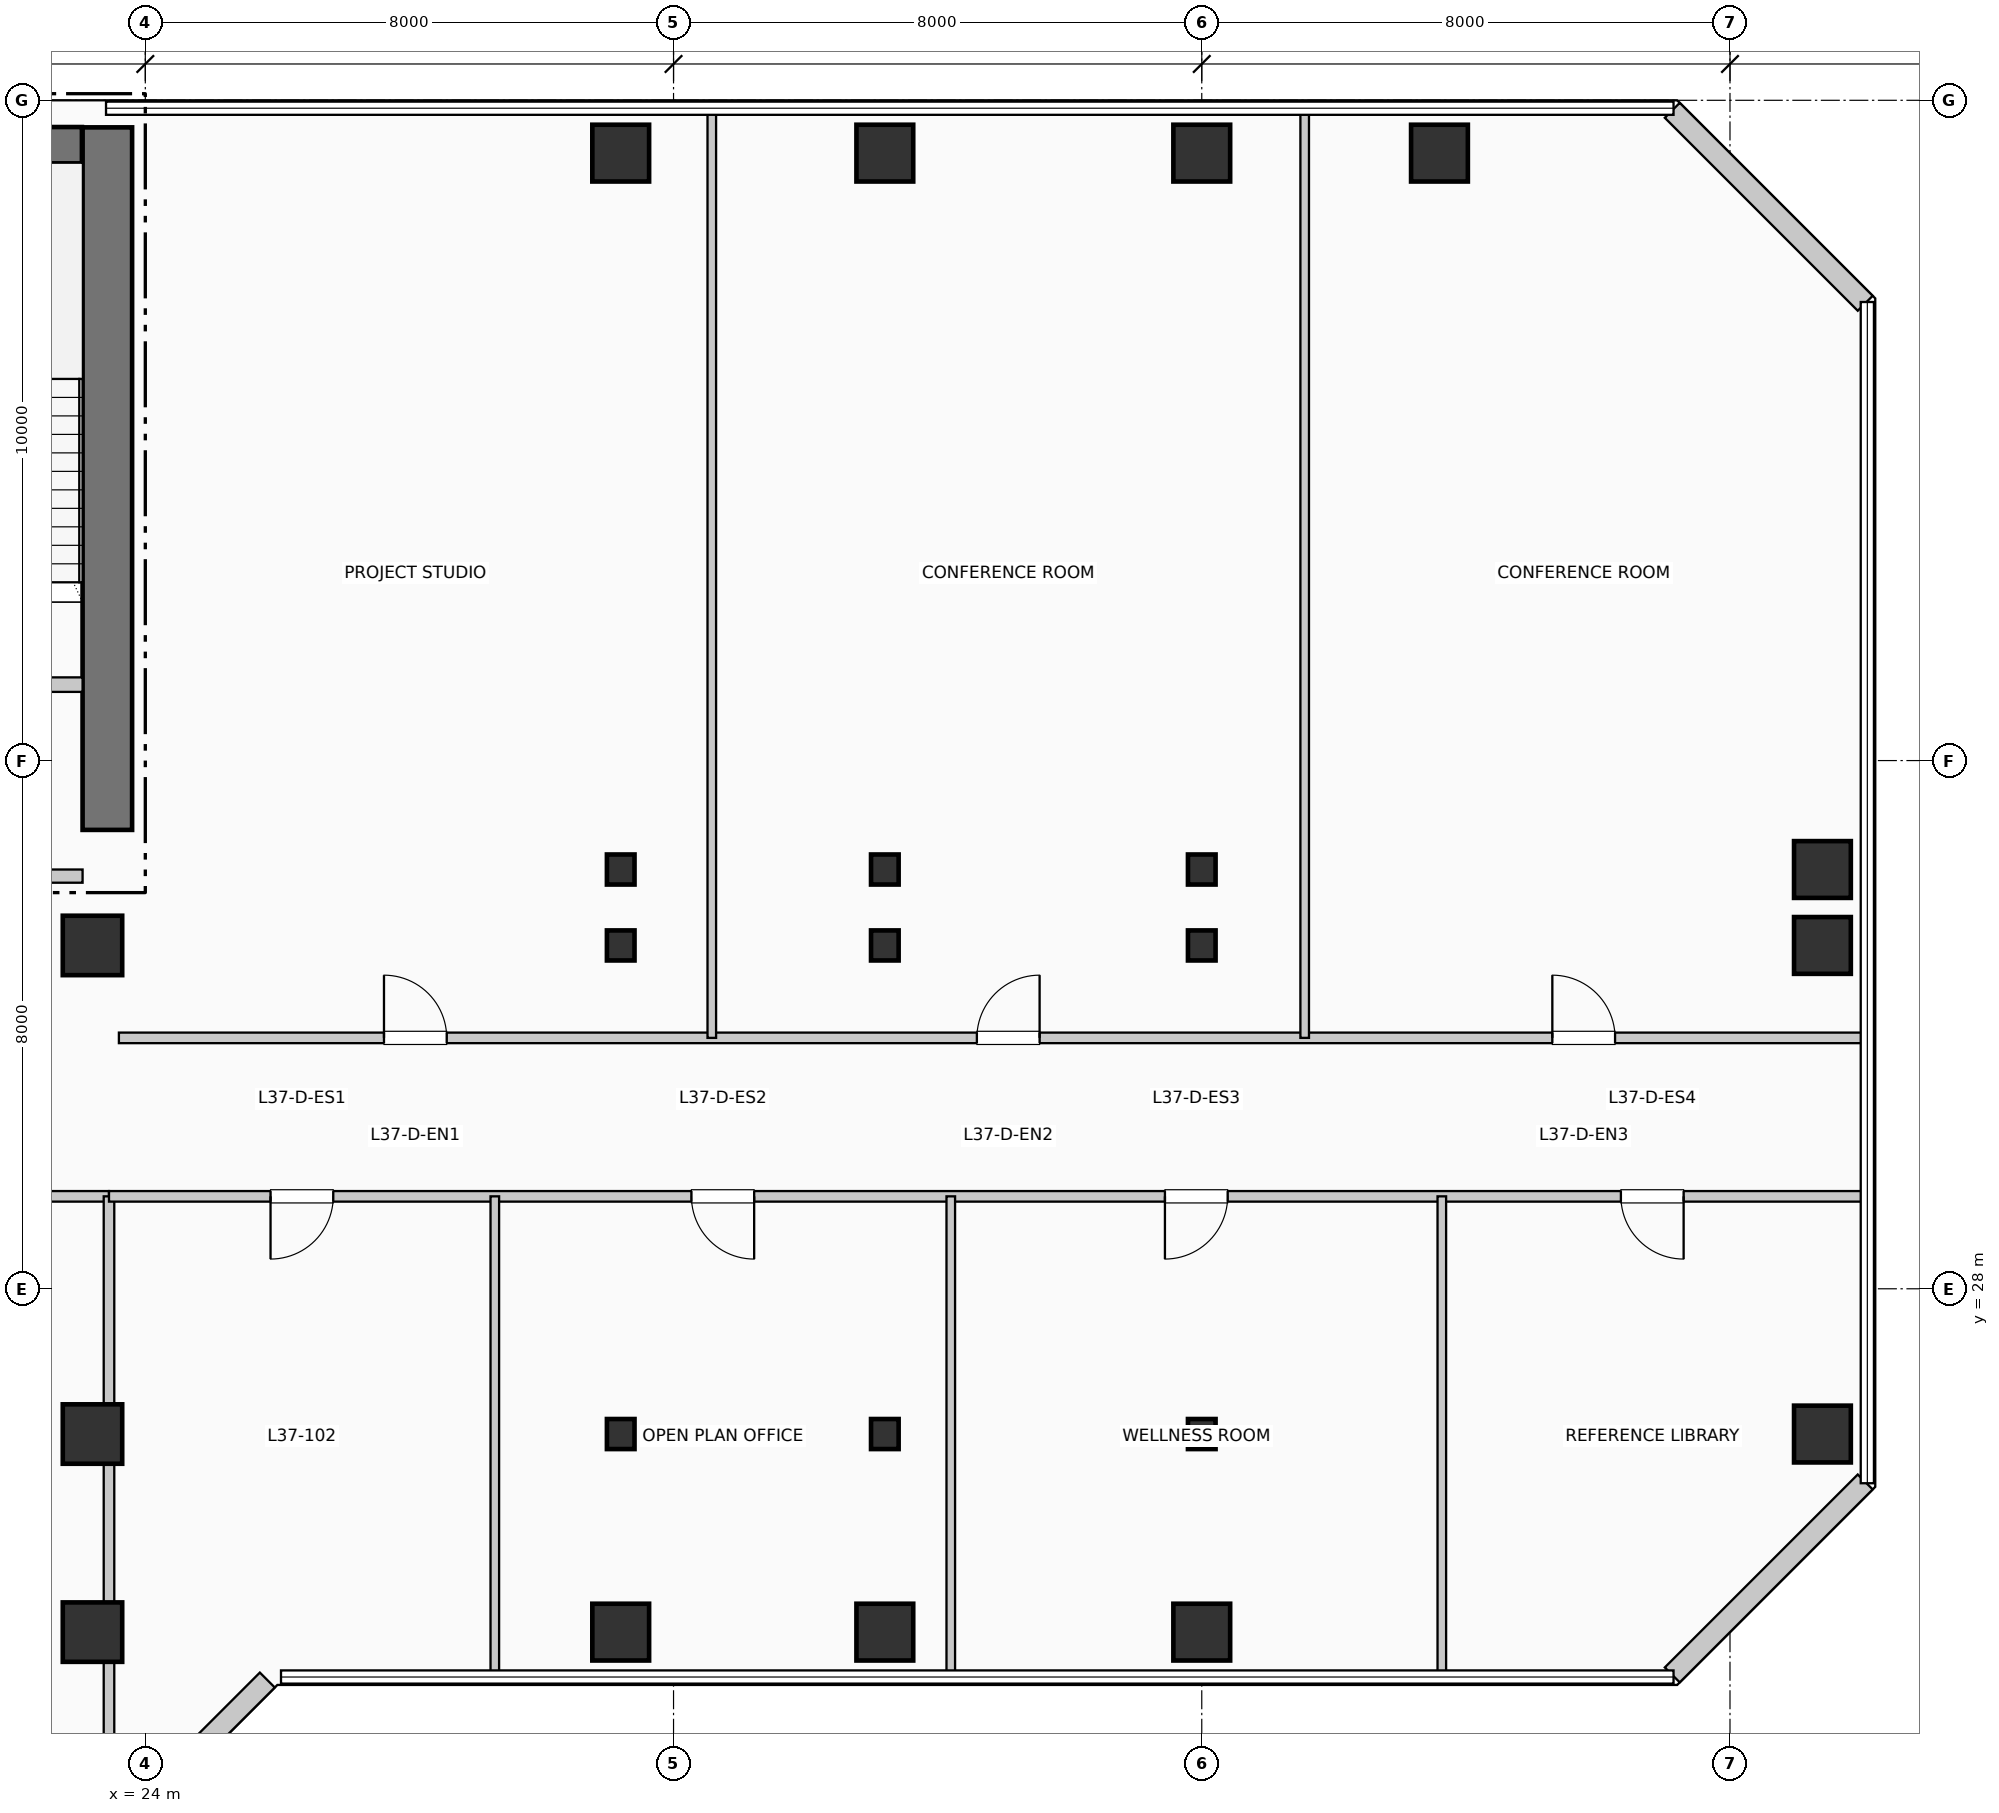
"""IFC4 building model, lengths in metres.
Left out: names, types, materials, properties, quantities, classifications, styles, units other than length and angle.
Written with IfcOpenShell. Run it as: python <this file> out.ifc"""

import sys

from ifc_helpers import new_model, si_unit, direction, frame, frame_2d, origin, origin_2d, place, context, subcontext, project, spatial, rectangle, i_section, extrude, element, fill, save


model = new_model("IFC4")
c1 = context("Model", 3, precision=1e-05, world=origin(), true_north=direction((0.0, 1.0)))
c2 = subcontext(c1, "Body", "Model", "MODEL_VIEW")
j1 = project(units=[si_unit("LENGTHUNIT", "METRE"), si_unit("PLANEANGLEUNIT", "RADIAN")], contexts=[c1])
p1 = place(None, origin())
s1 = spatial("IfcSite", under=j1, at=p1, CompositionType="ELEMENT")
p2 = place(p1, origin())
s2 = spatial("IfcBuilding", under=s1, at=p2, CompositionType="ELEMENT")
p3 = place(p2, frame((0.0, 0.0, 154.77)))
s3 = spatial("IfcBuildingStorey", under=s2, at=p3, CompositionType="ELEMENT", Elevation=154.77)
p4 = place(p3, frame((23.425, 34.95, 0.0), z_axis=(0.0, 0.0, 1.0), x_axis=(0.0, 1.0, 0.0)))
e1 = element("IfcWall", 1, at=p4, inside=s3, PredefinedType="SHEAR", context=c2, shape_type="SweptSolid", body=[
    extrude(rectangle(XDim=10.64, YDim=0.75, at=frame_2d((5.32, 0.0))), origin(), (0.0, 0.0, 1.0), 3.96),
])
p5 = place(p3, frame((19.35, 45.32, 0.0), z_axis=(0.0, 0.0, 1.0), x_axis=(1.0, 0.0, 0.0)))
e2 = element("IfcWall", 2, at=p5, inside=s3, PredefinedType="SHEAR", context=c2, shape_type="SweptSolid", body=[
    extrude(rectangle(XDim=3.69, YDim=0.55, at=frame_2d((1.845, 0.0))), origin(), (0.0, 0.0, 1.0), 3.96),
])
p6 = place(p5, frame((1.15, 0.0, 1.05)))
e3 = element("IfcOpeningElement", 3, at=p6, cuts=e2, PredefinedType="OPENING", context=c2, shape_type="SweptSolid", body=[
    extrude(rectangle(XDim=1.4, YDim=1.8, at=frame_2d((0.7, 0.9))), frame((0.0, 0.285, 0.0), z_axis=(0.0, -1.0, 0.0), x_axis=(1.0, 0.0, 0.0)), (0.0, 0.0, 1.0), 0.57),
])
for number, where, z_axis, x_axis in (
    (4, (23.2, 22.8, 0.0), (0.0, 0.0, 1.0), (1.0, 0.0, 0.0)),
    (5, (23.2, 25.8, 0.0), (0.0, 0.0, 1.0), (1.0, 0.0, 0.0)),
    (6, (23.2, 33.2, 0.0), (0.0, 0.0, 1.0), (1.0, 0.0, 0.0)),
):
    element("IfcColumn", number, at=place(p3, frame(where, z_axis=z_axis, x_axis=x_axis)), inside=s3, PredefinedType="COLUMN", context=c2, shape_type="SweptSolid", body=[
        extrude(rectangle(XDim=0.9, YDim=0.9, at=origin_2d()), origin(), (0.0, 0.0, 1.0), 3.96),
    ])
p7 = place(p3, frame((31.2, 22.8, 0.0), z_axis=(0.0, 0.0, 1.0), x_axis=(1.0, 0.0, 0.0)))
e7 = element("IfcColumn", 7, at=p7, inside=s3, PredefinedType="COLUMN", context=c2, shape_type="SweptSolid", body=[
    extrude(rectangle(XDim=0.86, YDim=0.86, at=origin_2d()), origin(), (0.0, 0.0, 1.0), 3.96),
])
for number, where, z_axis, x_axis in (
    (8, (31.2, 25.8, 0.0), (0.0, 0.0, 1.0), (1.0, 0.0, 0.0)),
    (9, (31.2, 33.2, 0.0), (0.0, 0.0, 1.0), (1.0, 0.0, 0.0)),
    (10, (31.2, 34.35, 0.0), (0.0, 0.0, 1.0), (1.0, 0.0, 0.0)),
):
    element("IfcColumn", number, at=place(p3, frame(where, z_axis=z_axis, x_axis=x_axis)), inside=s3, PredefinedType="COLUMN", context=c2, shape_type="SweptSolid", body=[
        extrude(i_section(OverallWidth=0.418, OverallDepth=0.455, WebThickness=0.032, FlangeThickness=0.051, at=origin_2d()), origin(), (0.0, 0.0, 1.0), 3.96),
    ])
for number, where, z_axis, x_axis in (
    (11, (31.2, 45.2, 0.0), (0.0, 0.0, 1.0), (1.0, 0.0, 0.0)),
    (12, (35.2, 22.8, 0.0), (0.0, 0.0, 1.0), (1.0, 0.0, 0.0)),
):
    element("IfcColumn", number, at=place(p3, frame(where, z_axis=z_axis, x_axis=x_axis)), inside=s3, PredefinedType="COLUMN", context=c2, shape_type="SweptSolid", body=[
        extrude(rectangle(XDim=0.86, YDim=0.86, at=origin_2d()), origin(), (0.0, 0.0, 1.0), 3.96),
    ])
for number, where, z_axis, x_axis in (
    (13, (35.2, 25.8, 0.0), (0.0, 0.0, 1.0), (1.0, 0.0, 0.0)),
    (14, (35.2, 33.2, 0.0), (0.0, 0.0, 1.0), (1.0, 0.0, 0.0)),
    (15, (35.2, 34.35, 0.0), (0.0, 0.0, 1.0), (1.0, 0.0, 0.0)),
):
    element("IfcColumn", number, at=place(p3, frame(where, z_axis=z_axis, x_axis=x_axis)), inside=s3, PredefinedType="COLUMN", context=c2, shape_type="SweptSolid", body=[
        extrude(i_section(OverallWidth=0.418, OverallDepth=0.455, WebThickness=0.032, FlangeThickness=0.051, at=origin_2d()), origin(), (0.0, 0.0, 1.0), 3.96),
    ])
for number, where, z_axis, x_axis in (
    (16, (35.2, 45.2, 0.0), (0.0, 0.0, 1.0), (1.0, 0.0, 0.0)),
    (17, (40.0, 22.8, 0.0), (0.0, 0.0, 1.0), (1.0, 0.0, 0.0)),
):
    element("IfcColumn", number, at=place(p3, frame(where, z_axis=z_axis, x_axis=x_axis)), inside=s3, PredefinedType="COLUMN", context=c2, shape_type="SweptSolid", body=[
        extrude(rectangle(XDim=0.86, YDim=0.86, at=origin_2d()), origin(), (0.0, 0.0, 1.0), 3.96),
    ])
for number, where, z_axis, x_axis in (
    (18, (40.0, 25.8, 0.0), (0.0, 0.0, 1.0), (1.0, 0.0, 0.0)),
    (19, (40.0, 33.2, 0.0), (0.0, 0.0, 1.0), (1.0, 0.0, 0.0)),
    (20, (40.0, 34.35, 0.0), (0.0, 0.0, 1.0), (1.0, 0.0, 0.0)),
):
    element("IfcColumn", number, at=place(p3, frame(where, z_axis=z_axis, x_axis=x_axis)), inside=s3, PredefinedType="COLUMN", context=c2, shape_type="SweptSolid", body=[
        extrude(i_section(OverallWidth=0.418, OverallDepth=0.455, WebThickness=0.032, FlangeThickness=0.051, at=origin_2d()), origin(), (0.0, 0.0, 1.0), 3.96),
    ])
for number, where, z_axis, x_axis in (
    (21, (40.0, 45.2, 0.0), (0.0, 0.0, 1.0), (1.0, 0.0, 0.0)),
    (22, (43.6, 45.2, 0.0), (0.0, 0.0, 1.0), (1.0, 0.0, 0.0)),
    (23, (49.4, 25.8, 0.0), (0.0, 0.0, 1.0), (1.0, 0.0, 0.0)),
    (24, (49.4, 33.2, 0.0), (0.0, 0.0, 1.0), (1.0, 0.0, 0.0)),
    (25, (49.4, 34.35, 0.0), (0.0, 0.0, 1.0), (1.0, 0.0, 0.0)),
):
    element("IfcColumn", number, at=place(p3, frame(where, z_axis=z_axis, x_axis=x_axis)), inside=s3, PredefinedType="COLUMN", context=c2, shape_type="SweptSolid", body=[
        extrude(rectangle(XDim=0.86, YDim=0.86, at=origin_2d()), origin(), (0.0, 0.0, 1.0), 3.96),
    ])
p8 = place(p3, frame((23.926, 20.152, 0.0), z_axis=(0.0, 0.0, 1.0), x_axis=(0.707106781187, 0.707106781187, 0.0)))
e26 = element("IfcWall", 26, at=p8, inside=s3, PredefinedType="SOLIDWALL", context=c2, shape_type="SweptSolid", body=[
    extrude(rectangle(XDim=2.718, YDim=0.32, at=frame_2d((1.359, 0.0))), origin(), (0.0, 0.0, 1.0), 3.71),
])
for number, where, z_axis, x_axis in (
    (27, (47.126, 22.152, 0.0), (0.0, 0.0, 1.0), (0.707, 0.707, 0.0)),
    (28, (50.048, 42.926, 0.0), (0.0, 0.0, 1.0), (-0.707, 0.707, 0.0)),
):
    element("IfcWall", number, at=place(p3, frame(where, z_axis=z_axis, x_axis=x_axis)), inside=s3, PredefinedType="SOLIDWALL", context=c2, shape_type="SweptSolid", body=[
        extrude(rectangle(XDim=4.133, YDim=0.32, at=frame_2d((2.066, 0.0))), origin(), (0.0, 0.0, 1.0), 3.71),
    ])
p9 = place(p3, frame((19.9, 37.15, 0.0), z_axis=(0.0, 0.0, 1.0), x_axis=(1.0, 0.0, 0.0)))
e29 = element("IfcWall", 29, at=p9, inside=s3, PredefinedType="PARTITIONING", context=c2, shape_type="SweptSolid", body=[
    extrude(rectangle(XDim=3.15, YDim=0.22, at=frame_2d((1.575, 0.0))), origin(), (0.0, 0.0, 1.0), 3.71),
])
p10 = place(p9, frame((2.05, 0.0, 0.0), z_axis=(0.0, 0.0, 1.0), x_axis=(-1.0, 0.0, 0.0)))
e30 = element("IfcOpeningElement", 30, at=p10, cuts=e29, PredefinedType="OPENING", context=c2, shape_type="SweptSolid", body=[
    extrude(rectangle(XDim=1.05, YDim=2.15, at=frame_2d((0.525, 1.075))), frame((0.0, 0.12, 0.0), z_axis=(0.0, -1.0, 0.0), x_axis=(1.0, 0.0, 0.0)), (0.0, 0.0, 1.0), 0.24),
])
p11 = place(p3, frame((19.8, 34.25, 0.0), z_axis=(0.0, 0.0, 1.0), x_axis=(1.0, 0.0, 0.0)))
e31 = element("IfcWall", 31, at=p11, inside=s3, PredefinedType="PARTITIONING", context=c2, shape_type="SweptSolid", body=[
    extrude(rectangle(XDim=3.25, YDim=0.2, at=frame_2d((1.625, 0.0))), origin(), (0.0, 0.0, 1.0), 3.71),
])
p12 = place(p11, frame((2.15, 0.0, 0.0), z_axis=(0.0, 0.0, 1.0), x_axis=(-1.0, 0.0, 0.0)))
e32 = element("IfcOpeningElement", 32, at=p12, cuts=e31, PredefinedType="OPENING", context=c2, shape_type="SweptSolid", body=[
    extrude(rectangle(XDim=1.1, YDim=2.15, at=frame_2d((0.55, 1.075))), frame((0.0, 0.11, 0.0), z_axis=(0.0, -1.0, 0.0), x_axis=(1.0, 0.0, 0.0)), (0.0, 0.0, 1.0), 0.22),
])
p13 = place(p3, frame((10.9, 29.4, 0.0), z_axis=(0.0, 0.0, 1.0), x_axis=(1.0, 0.0, 0.0)))
e33 = element("IfcWall", 33, at=p13, inside=s3, PredefinedType="PARTITIONING", context=c2, shape_type="SweptSolid", body=[
    extrude(rectangle(XDim=12.55, YDim=0.16, at=frame_2d((6.275, 0.0))), origin(), (0.0, 0.0, 1.0), 3.365),
])
p14 = place(p3, frame((23.45, 0.19, 0.0), z_axis=(0.0, 0.0, 1.0), x_axis=(0.0, 1.0, 0.0)))
e34 = element("IfcWall", 34, at=p14, inside=s3, PredefinedType="PARTITIONING", context=c2, shape_type="SweptSolid", body=[
    extrude(rectangle(XDim=29.21, YDim=0.16, at=frame_2d((14.605, 0.0))), origin(), (0.0, 0.0, 1.0), 3.045),
])
p15 = place(p3, frame((23.45, 29.4, 0.0), z_axis=(0.0, 0.0, 1.0), x_axis=(1.0, 0.0, 0.0)))
e35 = element("IfcWall", 35, at=p15, inside=s3, PredefinedType="PARTITIONING", context=c2, shape_type="SweptSolid", body=[
    extrude(rectangle(XDim=26.56, YDim=0.16, at=frame_2d((13.28, 0.0))), origin(), (0.0, 0.0, 1.0), 3.365),
])
p16 = place(p15, frame((3.396, 0.0, 0.0), z_axis=(0.0, 0.0, 1.0), x_axis=(-1.0, 0.0, 0.0)))
e36 = element("IfcOpeningElement", 36, at=p16, cuts=e35, PredefinedType="OPENING", context=c2, shape_type="SweptSolid", body=[
    extrude(rectangle(XDim=0.95, YDim=2.15, at=frame_2d((0.475, 1.075))), frame((0.0, 0.09, 0.0), z_axis=(0.0, -1.0, 0.0), x_axis=(1.0, 0.0, 0.0)), (0.0, 0.0, 1.0), 0.18),
])
p17 = place(p15, frame((9.771, 0.0, 0.0), z_axis=(0.0, 0.0, 1.0), x_axis=(-1.0, 0.0, 0.0)))
e37 = element("IfcOpeningElement", 37, at=p17, cuts=e35, PredefinedType="OPENING", context=c2, shape_type="SweptSolid", body=[
    extrude(rectangle(XDim=0.95, YDim=2.15, at=frame_2d((0.475, 1.075))), frame((0.0, 0.09, 0.0), z_axis=(0.0, -1.0, 0.0), x_axis=(1.0, 0.0, 0.0)), (0.0, 0.0, 1.0), 0.18),
])
p18 = place(p15, frame((16.942, 0.0, 0.0), z_axis=(0.0, 0.0, 1.0), x_axis=(-1.0, 0.0, 0.0)))
e38 = element("IfcOpeningElement", 38, at=p18, cuts=e35, PredefinedType="OPENING", context=c2, shape_type="SweptSolid", body=[
    extrude(rectangle(XDim=0.95, YDim=2.15, at=frame_2d((0.475, 1.075))), frame((0.0, 0.09, 0.0), z_axis=(0.0, -1.0, 0.0), x_axis=(1.0, 0.0, 0.0)), (0.0, 0.0, 1.0), 0.18),
])
p19 = place(p15, frame((23.848, 0.0, 0.0), z_axis=(0.0, 0.0, 1.0), x_axis=(-1.0, 0.0, 0.0)))
e39 = element("IfcOpeningElement", 39, at=p19, cuts=e35, PredefinedType="OPENING", context=c2, shape_type="SweptSolid", body=[
    extrude(rectangle(XDim=0.95, YDim=2.15, at=frame_2d((0.475, 1.075))), frame((0.0, 0.09, 0.0), z_axis=(0.0, -1.0, 0.0), x_axis=(1.0, 0.0, 0.0)), (0.0, 0.0, 1.0), 0.18),
])
p20 = place(p3, frame((23.6, 31.8, 0.0), z_axis=(0.0, 0.0, 1.0), x_axis=(1.0, 0.0, 0.0)))
e40 = element("IfcWall", 40, at=p20, inside=s3, PredefinedType="PARTITIONING", context=c2, shape_type="SweptSolid", body=[
    extrude(rectangle(XDim=26.41, YDim=0.16, at=frame_2d((13.205, 0.0))), origin(), (0.0, 0.0, 1.0), 3.71),
])
p21 = place(p20, frame((4.015, 0.0, 0.0)))
e41 = element("IfcOpeningElement", 41, at=p21, cuts=e40, PredefinedType="OPENING", context=c2, shape_type="SweptSolid", body=[
    extrude(rectangle(XDim=0.95, YDim=2.15, at=frame_2d((0.475, 1.075))), frame((0.0, 0.09, 0.0), z_axis=(0.0, -1.0, 0.0), x_axis=(1.0, 0.0, 0.0)), (0.0, 0.0, 1.0), 0.18),
])
p22 = place(p20, frame((12.994, 0.0, 0.0)))
e42 = element("IfcOpeningElement", 42, at=p22, cuts=e40, PredefinedType="OPENING", context=c2, shape_type="SweptSolid", body=[
    extrude(rectangle(XDim=0.95, YDim=2.15, at=frame_2d((0.475, 1.075))), frame((0.0, 0.09, 0.0), z_axis=(0.0, -1.0, 0.0), x_axis=(1.0, 0.0, 0.0)), (0.0, 0.0, 1.0), 0.18),
])
p23 = place(p20, frame((21.709, 0.0, 0.0)))
e43 = element("IfcOpeningElement", 43, at=p23, cuts=e40, PredefinedType="OPENING", context=c2, shape_type="SweptSolid", body=[
    extrude(rectangle(XDim=0.95, YDim=2.15, at=frame_2d((0.475, 1.075))), frame((0.0, 0.09, 0.0), z_axis=(0.0, -1.0, 0.0), x_axis=(1.0, 0.0, 0.0)), (0.0, 0.0, 1.0), 0.18),
])
for number, where, z_axis, x_axis in (
    (44, (29.293, 22.19, 0.0), (0.0, 0.0, 1.0), (0.0, 1.0, 0.0)),
    (45, (36.199, 22.19, 0.0), (0.0, 0.0, 1.0), (0.0, 1.0, 0.0)),
    (46, (43.635, 22.19, 0.0), (0.0, 0.0, 1.0), (0.0, 1.0, 0.0)),
):
    element("IfcWall", number, at=place(p3, frame(where, z_axis=z_axis, x_axis=x_axis)), inside=s3, PredefinedType="PARTITIONING", context=c2, shape_type="SweptSolid", body=[
        extrude(rectangle(XDim=7.21, YDim=0.13, at=frame_2d((3.605, 0.0))), origin(), (0.0, 0.0, 1.0), 3.71),
    ])
for number, where, z_axis, x_axis in (
    (47, (32.579, 31.8, 0.0), (0.0, 0.0, 1.0), (0.0, 1.0, 0.0)),
    (48, (41.559, 31.8, 0.0), (0.0, 0.0, 1.0), (0.0, 1.0, 0.0)),
):
    element("IfcWall", number, at=place(p3, frame(where, z_axis=z_axis, x_axis=x_axis)), inside=s3, PredefinedType="PARTITIONING", context=c2, shape_type="SweptSolid", body=[
        extrude(rectangle(XDim=14.01, YDim=0.13, at=frame_2d((7.005, 0.0))), origin(), (0.0, 0.0, 1.0), 3.71),
    ])
p24 = place(p16, origin())
e49 = element("IfcDoor", 49, at=p24, inside=s3, OperationType="SINGLE_SWING_LEFT", PredefinedType="DOOR", context=c2, shape_type="SweptSolid", body=[
    extrude(rectangle(XDim=0.95, YDim=2.15, at=frame_2d((0.475, 1.075))), frame((0.0, 0.025, 0.0), z_axis=(0.0, -1.0, 0.0), x_axis=(1.0, 0.0, 0.0)), (0.0, 0.0, 1.0), 0.05),
])
fill(e36, e49)
p25 = place(p17, origin())
e50 = element("IfcDoor", 50, at=p25, inside=s3, OperationType="SINGLE_SWING_RIGHT", PredefinedType="DOOR", context=c2, shape_type="SweptSolid", body=[
    extrude(rectangle(XDim=0.95, YDim=2.15, at=frame_2d((0.475, 1.075))), frame((0.0, 0.025, 0.0), z_axis=(0.0, -1.0, 0.0), x_axis=(1.0, 0.0, 0.0)), (0.0, 0.0, 1.0), 0.05),
])
fill(e37, e50)
p26 = place(p18, origin())
e51 = element("IfcDoor", 51, at=p26, inside=s3, OperationType="SINGLE_SWING_LEFT", PredefinedType="DOOR", context=c2, shape_type="SweptSolid", body=[
    extrude(rectangle(XDim=0.95, YDim=2.15, at=frame_2d((0.475, 1.075))), frame((0.0, 0.025, 0.0), z_axis=(0.0, -1.0, 0.0), x_axis=(1.0, 0.0, 0.0)), (0.0, 0.0, 1.0), 0.05),
])
fill(e38, e51)
p27 = place(p19, origin())
e52 = element("IfcDoor", 52, at=p27, inside=s3, OperationType="SINGLE_SWING_RIGHT", PredefinedType="DOOR", context=c2, shape_type="SweptSolid", body=[
    extrude(rectangle(XDim=0.95, YDim=2.15, at=frame_2d((0.475, 1.075))), frame((0.0, 0.025, 0.0), z_axis=(0.0, -1.0, 0.0), x_axis=(1.0, 0.0, 0.0)), (0.0, 0.0, 1.0), 0.05),
])
fill(e39, e52)
p28 = place(p21, origin())
e53 = element("IfcDoor", 53, at=p28, inside=s3, OperationType="SINGLE_SWING_LEFT", PredefinedType="DOOR", context=c2, shape_type="SweptSolid", body=[
    extrude(rectangle(XDim=0.95, YDim=2.15, at=frame_2d((0.475, 1.075))), frame((0.0, 0.025, 0.0), z_axis=(0.0, -1.0, 0.0), x_axis=(1.0, 0.0, 0.0)), (0.0, 0.0, 1.0), 0.05),
])
fill(e41, e53)
p29 = place(p22, origin())
e54 = element("IfcDoor", 54, at=p29, inside=s3, OperationType="SINGLE_SWING_RIGHT", PredefinedType="DOOR", context=c2, shape_type="SweptSolid", body=[
    extrude(rectangle(XDim=0.95, YDim=2.15, at=frame_2d((0.475, 1.075))), frame((0.0, 0.025, 0.0), z_axis=(0.0, -1.0, 0.0), x_axis=(1.0, 0.0, 0.0)), (0.0, 0.0, 1.0), 0.05),
])
fill(e42, e54)
p30 = place(p23, origin())
e55 = element("IfcDoor", 55, at=p30, inside=s3, OperationType="SINGLE_SWING_LEFT", PredefinedType="DOOR", context=c2, shape_type="SweptSolid", body=[
    extrude(rectangle(XDim=0.95, YDim=2.15, at=frame_2d((0.475, 1.075))), frame((0.0, 0.025, 0.0), z_axis=(0.0, -1.0, 0.0), x_axis=(1.0, 0.0, 0.0)), (0.0, 0.0, 1.0), 0.05),
])
fill(e43, e55)
save(model, sys.argv[1])
